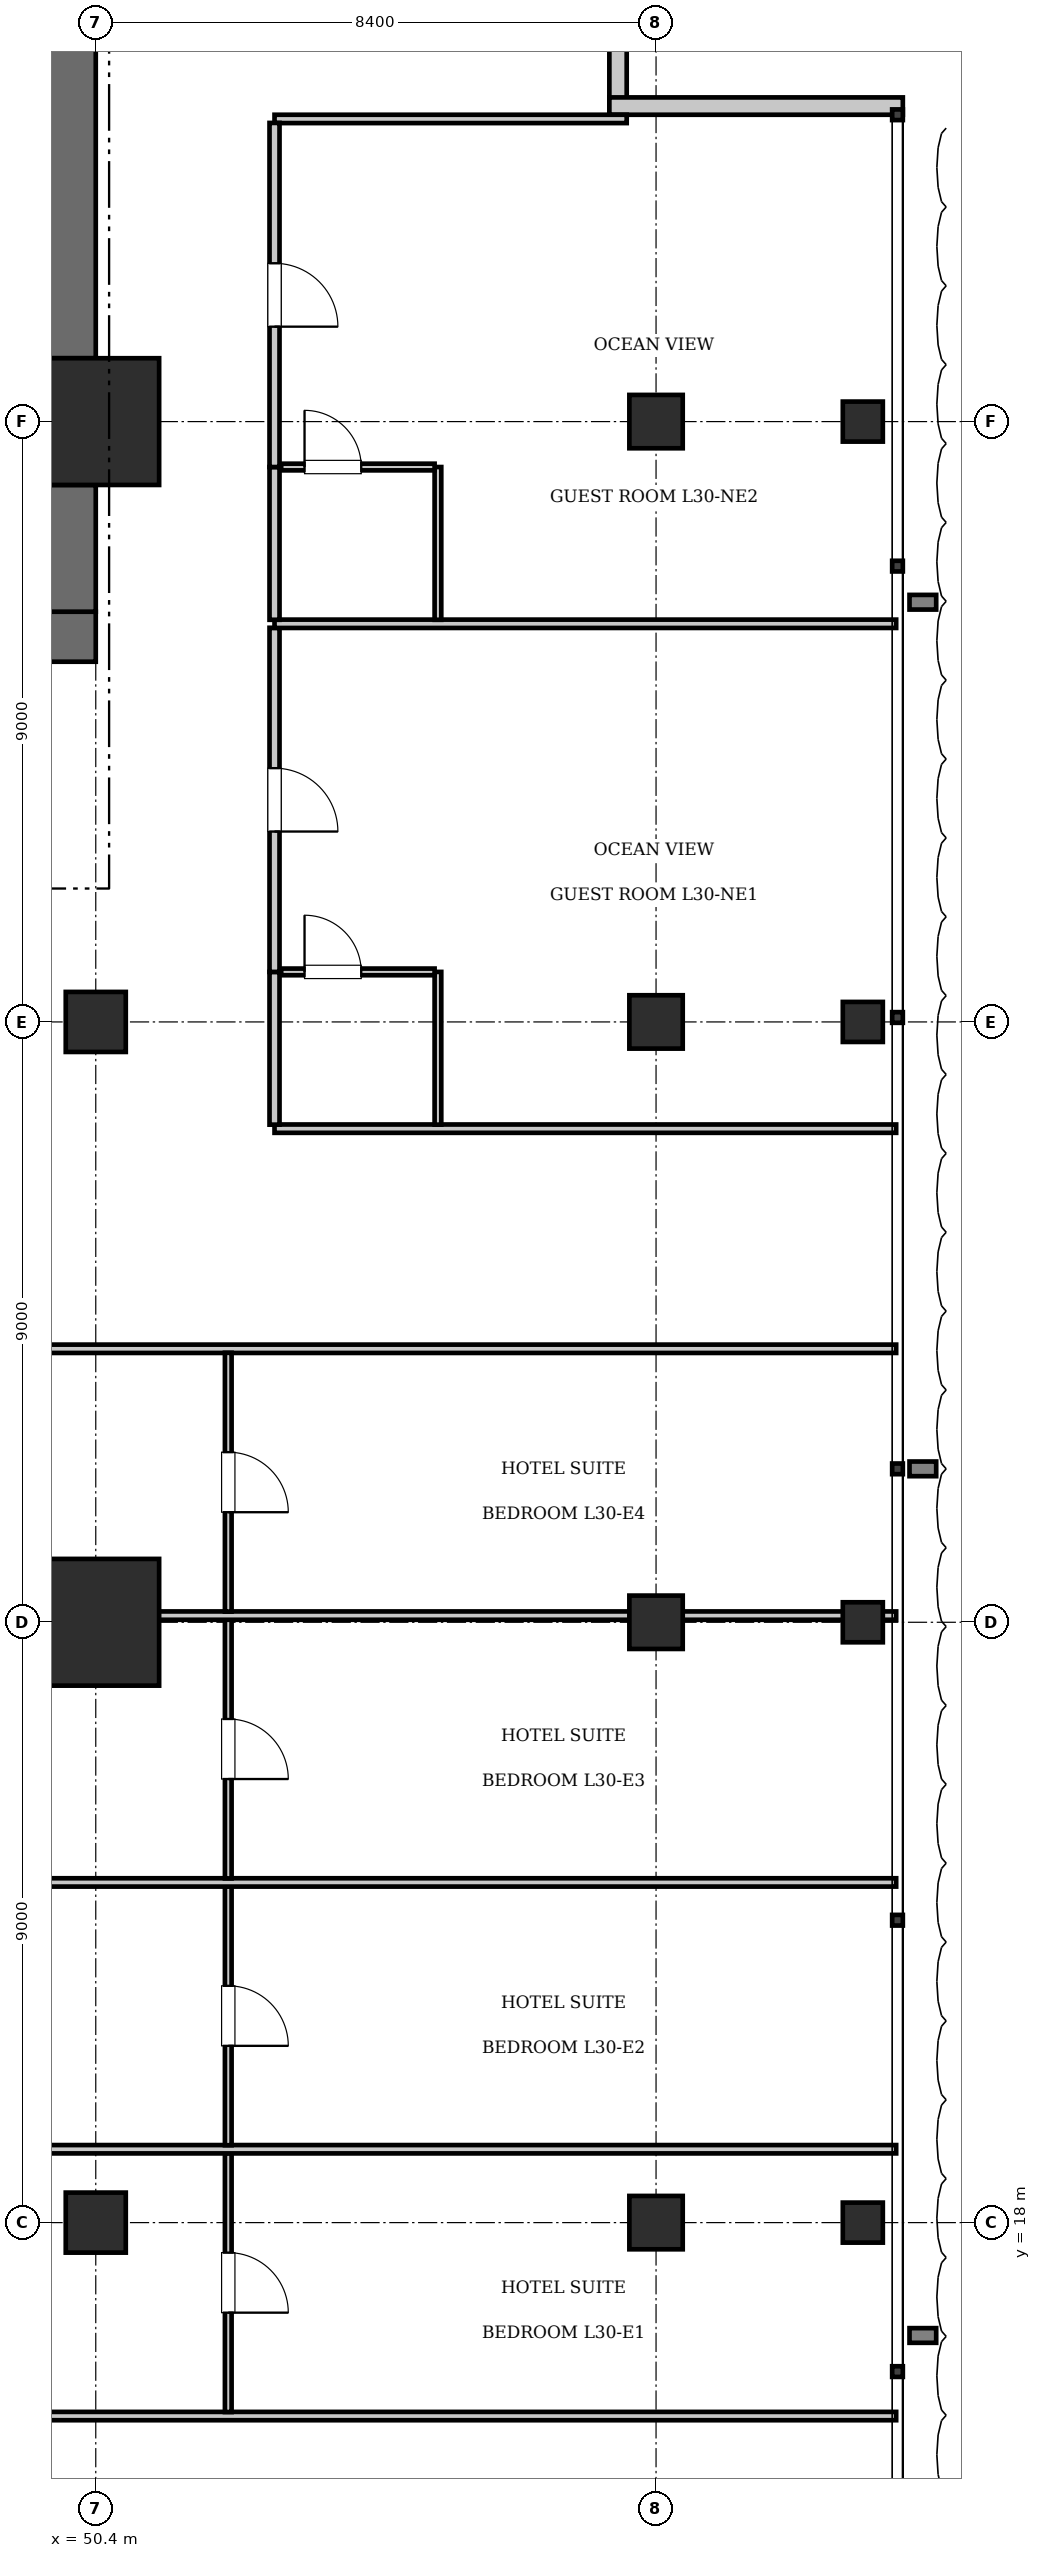
"""IFC4 building model, lengths in metres.
Left out: names, types, materials, properties, quantities, classifications, styles, units other than length and angle.
Written with IfcOpenShell. Run it as: python <this file> out.ifc"""

import sys

from ifc_helpers import new_model, si_unit, direction, frame, frame_2d, origin, origin_2d, place, context, subcontext, project, spatial, rectangle, i_section, extrude, element, fill, save


model = new_model("IFC4")
c1 = context("Model", 3, precision=1e-05, world=origin(), true_north=direction((0.0, 1.0)))
c2 = subcontext(c1, "Body", "Model", "MODEL_VIEW")
j1 = project(units=[si_unit("LENGTHUNIT", "METRE"), si_unit("PLANEANGLEUNIT", "RADIAN")], contexts=[c1])
p1 = place(None, origin())
s1 = spatial("IfcSite", under=j1, at=p1, CompositionType="ELEMENT")
p2 = place(p1, origin())
s2 = spatial("IfcBuilding", under=s1, at=p2, CompositionType="ELEMENT")
p3 = place(p2, frame((0.0, 0.0, 127.4)))
s3 = spatial("IfcBuildingStorey", under=s2, at=p3, CompositionType="ELEMENT", Elevation=127.4)
for number, where, z_axis, x_axis in (
    (1, (50.4, 27.0, 0.0), (0.0, 0.0, 1.0), (1.0, 0.0, 0.0)),
    (2, (50.4, 45.0, 0.0), (0.0, 0.0, 1.0), (1.0, 0.0, 0.0)),
):
    element("IfcColumn", number, at=place(p3, frame(where, z_axis=z_axis, x_axis=x_axis)), inside=s3, PredefinedType="COLUMN", context=c2, shape_type="SweptSolid", body=[
        extrude(rectangle(XDim=1.9, YDim=1.9, at=origin_2d()), origin(), (0.0, 0.0, 1.0), 3.85),
    ])
p4 = place(p3, frame((43.6, 41.775, 0.0), z_axis=(0.0, 0.0, 1.0), x_axis=(1.0, 0.0, 0.0)))
e3 = element("IfcWall", 3, at=p4, inside=s3, PredefinedType="SHEAR", context=c2, shape_type="SweptSolid", body=[
    extrude(rectangle(XDim=6.8, YDim=0.75, at=frame_2d((3.4, 0.0))), origin(), (0.0, 0.0, 1.0), 3.85),
])
p5 = place(p4, frame((3.9, 0.0, 0.0)))
e4 = element("IfcOpeningElement", 4, at=p5, cuts=e3, PredefinedType="OPENING", context=c2, shape_type="SweptSolid", body=[
    extrude(rectangle(XDim=1.15, YDim=2.15, at=frame_2d((0.575, 1.075))), frame((0.0, 0.385, 0.0), z_axis=(0.0, -1.0, 0.0), x_axis=(1.0, 0.0, 0.0)), (0.0, 0.0, 1.0), 0.77),
])
p6 = place(p4, frame((0.55, 0.0, 0.0)))
e5 = element("IfcOpeningElement", 5, at=p6, cuts=e3, PredefinedType="OPENING", context=c2, shape_type="SweptSolid", body=[
    extrude(rectangle(XDim=1.1, YDim=2.2, at=frame_2d((0.55, 1.1))), frame((0.0, 0.385, 0.0), z_axis=(0.0, -1.0, 0.0), x_axis=(1.0, 0.0, 0.0)), (0.0, 0.0, 1.0), 0.77),
])
p7 = place(p3, frame((50.025, 42.15, 0.0), z_axis=(0.0, 0.0, 1.0), x_axis=(0.0, 1.0, 0.0)))
e6 = element("IfcWall", 6, at=p7, inside=s3, PredefinedType="SHEAR", context=c2, shape_type="SweptSolid", body=[
    extrude(rectangle(XDim=1.9, YDim=0.75, at=frame_2d((0.95, 0.0))), origin(), (0.0, 0.0, 1.0), 3.85),
])
p8 = place(p3, frame((50.025, 45.95, 0.0), z_axis=(0.0, 0.0, 1.0), x_axis=(0.0, 1.0, 0.0)))
e7 = element("IfcWall", 7, at=p8, inside=s3, PredefinedType="SHEAR", context=c2, shape_type="SweptSolid", body=[
    extrude(rectangle(XDim=7.3, YDim=0.75, at=frame_2d((3.65, 0.0))), origin(), (0.0, 0.0, 1.0), 3.85),
])
for number, where, z_axis, x_axis in (
    (8, (50.4, 36.0, 0.0), (0.0, 0.0, 1.0), (1.0, 0.0, 0.0)),
    (9, (50.4, 18.0, 0.0), (0.0, 0.0, 1.0), (1.0, 0.0, 0.0)),
):
    element("IfcColumn", number, at=place(p3, frame(where, z_axis=z_axis, x_axis=x_axis)), inside=s3, PredefinedType="COLUMN", context=c2, shape_type="SweptSolid", body=[
        extrude(rectangle(XDim=0.9, YDim=0.9, at=origin_2d()), origin(), (0.0, 0.0, 1.0), 3.85),
    ])
for number, where, z_axis, x_axis in (
    (10, (58.8, 18.0, 0.0), (0.0, 0.0, 1.0), (1.0, 0.0, 0.0)),
    (11, (58.8, 27.0, 0.0), (0.0, 0.0, 1.0), (1.0, 0.0, 0.0)),
    (12, (58.8, 36.0, 0.0), (0.0, 0.0, 1.0), (1.0, 0.0, 0.0)),
    (13, (58.8, 45.0, 0.0), (0.0, 0.0, 1.0), (1.0, 0.0, 0.0)),
):
    element("IfcColumn", number, at=place(p3, frame(where, z_axis=z_axis, x_axis=x_axis)), inside=s3, PredefinedType="COLUMN", context=c2, shape_type="SweptSolid", body=[
        extrude(rectangle(XDim=0.8, YDim=0.8, at=origin_2d()), origin(), (0.0, 0.0, 1.0), 3.85),
    ])
for number, where, z_axis, x_axis in (
    (14, (61.9, 18.0, 0.0), (0.0, 0.0, 1.0), (1.0, 0.0, 0.0)),
    (15, (61.9, 27.0, 0.0), (0.0, 0.0, 1.0), (1.0, 0.0, 0.0)),
    (16, (61.9, 36.0, 0.0), (0.0, 0.0, 1.0), (1.0, 0.0, 0.0)),
    (17, (61.9, 45.0, 0.0), (0.0, 0.0, 1.0), (1.0, 0.0, 0.0)),
):
    element("IfcColumn", number, at=place(p3, frame(where, z_axis=z_axis, x_axis=x_axis)), inside=s3, PredefinedType="COLUMN", context=c2, shape_type="SweptSolid", body=[
        extrude(i_section(OverallWidth=0.6, OverallDepth=0.6, WebThickness=0.025, FlangeThickness=0.038, at=origin_2d()), origin(), (0.0, 0.0, 1.0), 3.85),
    ])
for number, where, z_axis, x_axis in (
    (18, (58.23, 54.0, 0.0), (0.0, 0.0, 1.0), (0.0, -1.0, 0.0)),
    (19, (58.1, 49.73, 0.0), (0.0, 0.0, 1.0), (1.0, 0.0, 0.0)),
):
    element("IfcWall", number, at=place(p3, frame(where, z_axis=z_axis, x_axis=x_axis)), inside=s3, PredefinedType="SOLIDWALL", context=c2, shape_type="SweptSolid", body=[
        extrude(rectangle(XDim=4.4, YDim=0.26, at=frame_2d((2.2, 0.0))), origin(), (0.0, 0.0, 1.0), 3.61),
    ])
for number, where, z_axis, x_axis in (
    (20, (38.98, 15.1, 0.0), (0.0, 0.0, 1.0), (1.0, 0.0, 0.0)),
    (21, (38.98, 31.1, 0.0), (0.0, 0.0, 1.0), (1.0, 0.0, 0.0)),
):
    element("IfcWall", number, at=place(p3, frame(where, z_axis=z_axis, x_axis=x_axis)), inside=s3, PredefinedType="PARTITIONING", context=c2, shape_type="SweptSolid", body=[
        extrude(rectangle(XDim=23.42, YDim=0.125, at=frame_2d((11.71, 0.0))), origin(), (0.0, 0.0, 1.0), 3.61),
    ])
p9 = place(p3, frame((52.386, 15.16, 0.0), z_axis=(0.0, 0.0, 1.0), x_axis=(0.0, 1.0, 0.0)))
e22 = element("IfcWall", 22, at=p9, inside=s3, PredefinedType="PARTITIONING", context=c2, shape_type="SweptSolid", body=[
    extrude(rectangle(XDim=3.88, YDim=0.1, at=frame_2d((1.94, 0.0))), origin(), (0.0, 0.0, 1.0), 3.61),
])
p10 = place(p9, frame((1.49, 0.0, 0.0)))
e23 = element("IfcOpeningElement", 23, at=p10, cuts=e22, PredefinedType="OPENING", context=c2, shape_type="SweptSolid", body=[
    extrude(rectangle(XDim=0.9, YDim=2.1, at=frame_2d((0.45, 1.05))), frame((0.0, 0.06, 0.0), z_axis=(0.0, -1.0, 0.0), x_axis=(1.0, 0.0, 0.0)), (0.0, 0.0, 1.0), 0.12),
])
p11 = place(p3, frame((38.98, 19.1, 0.0), z_axis=(0.0, 0.0, 1.0), x_axis=(1.0, 0.0, 0.0)))
e24 = element("IfcWall", 24, at=p11, inside=s3, PredefinedType="PARTITIONING", context=c2, shape_type="SweptSolid", body=[
    extrude(rectangle(XDim=23.42, YDim=0.125, at=frame_2d((11.71, 0.0))), origin(), (0.0, 0.0, 1.0), 3.61),
])
p12 = place(p3, frame((52.386, 19.16, 0.0), z_axis=(0.0, 0.0, 1.0), x_axis=(0.0, 1.0, 0.0)))
e25 = element("IfcWall", 25, at=p12, inside=s3, PredefinedType="PARTITIONING", context=c2, shape_type="SweptSolid", body=[
    extrude(rectangle(XDim=3.88, YDim=0.1, at=frame_2d((1.94, 0.0))), origin(), (0.0, 0.0, 1.0), 3.61),
])
p13 = place(p12, frame((1.49, 0.0, 0.0)))
e26 = element("IfcOpeningElement", 26, at=p13, cuts=e25, PredefinedType="OPENING", context=c2, shape_type="SweptSolid", body=[
    extrude(rectangle(XDim=0.9, YDim=2.1, at=frame_2d((0.45, 1.05))), frame((0.0, 0.06, 0.0), z_axis=(0.0, -1.0, 0.0), x_axis=(1.0, 0.0, 0.0)), (0.0, 0.0, 1.0), 0.12),
])
p14 = place(p3, frame((38.98, 23.1, 0.0), z_axis=(0.0, 0.0, 1.0), x_axis=(1.0, 0.0, 0.0)))
e27 = element("IfcWall", 27, at=p14, inside=s3, PredefinedType="PARTITIONING", context=c2, shape_type="SweptSolid", body=[
    extrude(rectangle(XDim=23.42, YDim=0.125, at=frame_2d((11.71, 0.0))), origin(), (0.0, 0.0, 1.0), 3.61),
])
p15 = place(p3, frame((52.386, 23.16, 0.0), z_axis=(0.0, 0.0, 1.0), x_axis=(0.0, 1.0, 0.0)))
e28 = element("IfcWall", 28, at=p15, inside=s3, PredefinedType="PARTITIONING", context=c2, shape_type="SweptSolid", body=[
    extrude(rectangle(XDim=3.88, YDim=0.1, at=frame_2d((1.94, 0.0))), origin(), (0.0, 0.0, 1.0), 3.61),
])
p16 = place(p15, frame((1.49, 0.0, 0.0)))
e29 = element("IfcOpeningElement", 29, at=p16, cuts=e28, PredefinedType="OPENING", context=c2, shape_type="SweptSolid", body=[
    extrude(rectangle(XDim=0.9, YDim=2.1, at=frame_2d((0.45, 1.05))), frame((0.0, 0.06, 0.0), z_axis=(0.0, -1.0, 0.0), x_axis=(1.0, 0.0, 0.0)), (0.0, 0.0, 1.0), 0.12),
])
p17 = place(p3, frame((38.98, 27.1, 0.0), z_axis=(0.0, 0.0, 1.0), x_axis=(1.0, 0.0, 0.0)))
e30 = element("IfcWall", 30, at=p17, inside=s3, PredefinedType="PARTITIONING", context=c2, shape_type="SweptSolid", body=[
    extrude(rectangle(XDim=23.42, YDim=0.125, at=frame_2d((11.71, 0.0))), origin(), (0.0, 0.0, 1.0), 2.41),
])
p18 = place(p3, frame((52.386, 27.16, 0.0), z_axis=(0.0, 0.0, 1.0), x_axis=(0.0, 1.0, 0.0)))
e31 = element("IfcWall", 31, at=p18, inside=s3, PredefinedType="PARTITIONING", context=c2, shape_type="SweptSolid", body=[
    extrude(rectangle(XDim=3.88, YDim=0.1, at=frame_2d((1.94, 0.0))), origin(), (0.0, 0.0, 1.0), 3.61),
])
p19 = place(p18, frame((1.49, 0.0, 0.0)))
e32 = element("IfcOpeningElement", 32, at=p19, cuts=e31, PredefinedType="OPENING", context=c2, shape_type="SweptSolid", body=[
    extrude(rectangle(XDim=0.9, YDim=2.1, at=frame_2d((0.45, 1.05))), frame((0.0, 0.06, 0.0), z_axis=(0.0, -1.0, 0.0), x_axis=(1.0, 0.0, 0.0)), (0.0, 0.0, 1.0), 0.12),
])
p20 = place(p3, frame((53.08, 34.4, 0.0), z_axis=(0.0, 0.0, 1.0), x_axis=(1.0, 0.0, 0.0)))
e33 = element("IfcWall", 33, at=p20, inside=s3, PredefinedType="PARTITIONING", context=c2, shape_type="SweptSolid", body=[
    extrude(rectangle(XDim=9.32, YDim=0.125, at=frame_2d((4.66, 0.0))), origin(), (0.0, 0.0, 1.0), 3.61),
])
p21 = place(p3, frame((53.08, 49.538, 0.0), z_axis=(0.0, 0.0, 1.0), x_axis=(1.0, 0.0, 0.0)))
e34 = element("IfcWall", 34, at=p21, inside=s3, PredefinedType="PARTITIONING", context=c2, shape_type="SweptSolid", body=[
    extrude(rectangle(XDim=5.28, YDim=0.125, at=frame_2d((2.64, 0.0))), origin(), (0.0, 0.0, 1.0), 3.61),
])
p22 = place(p3, frame((53.08, 34.46, 0.0), z_axis=(0.0, 0.0, 1.0), x_axis=(0.0, 1.0, 0.0)))
e35 = element("IfcWall", 35, at=p22, inside=s3, PredefinedType="PARTITIONING", context=c2, shape_type="SweptSolid", body=[
    extrude(rectangle(XDim=2.29, YDim=0.15, at=frame_2d((1.145, 0.0))), origin(), (0.0, 0.0, 1.0), 3.61),
])
p23 = place(p3, frame((53.08, 36.75, 0.0), z_axis=(0.0, 0.0, 1.0), x_axis=(0.0, 1.0, 0.0)))
e36 = element("IfcWall", 36, at=p23, inside=s3, PredefinedType="PARTITIONING", context=c2, shape_type="SweptSolid", body=[
    extrude(rectangle(XDim=5.159, YDim=0.15, at=frame_2d((2.579, 0.0))), origin(), (0.0, 0.0, 1.0), 3.61),
])
p24 = place(p23, frame((2.104, 0.0, 0.0)))
e37 = element("IfcOpeningElement", 37, at=p24, cuts=e36, PredefinedType="OPENING", context=c2, shape_type="SweptSolid", body=[
    extrude(rectangle(XDim=0.95, YDim=2.15, at=frame_2d((0.475, 1.075))), frame((0.0, 0.085, 0.0), z_axis=(0.0, -1.0, 0.0), x_axis=(1.0, 0.0, 0.0)), (0.0, 0.0, 1.0), 0.17),
])
p25 = place(p3, frame((55.53, 34.46, 0.0), z_axis=(0.0, 0.0, 1.0), x_axis=(0.0, 1.0, 0.0)))
e38 = element("IfcWall", 38, at=p25, inside=s3, PredefinedType="PARTITIONING", context=c2, shape_type="SweptSolid", body=[
    extrude(rectangle(XDim=2.29, YDim=0.1, at=frame_2d((1.145, 0.0))), origin(), (0.0, 0.0, 1.0), 3.61),
])
p26 = place(p3, frame((53.18, 36.75, 0.0), z_axis=(0.0, 0.0, 1.0), x_axis=(1.0, 0.0, 0.0)))
e39 = element("IfcWall", 39, at=p26, inside=s3, PredefinedType="PARTITIONING", context=c2, shape_type="SweptSolid", body=[
    extrude(rectangle(XDim=2.3, YDim=0.1, at=frame_2d((1.15, 0.0))), origin(), (0.0, 0.0, 1.0), 3.61),
])
p27 = place(p26, frame((0.35, 0.0, 0.0)))
e40 = element("IfcOpeningElement", 40, at=p27, cuts=e39, PredefinedType="OPENING", context=c2, shape_type="SweptSolid", body=[
    extrude(rectangle(XDim=0.85, YDim=2.1, at=frame_2d((0.425, 1.05))), frame((0.0, 0.06, 0.0), z_axis=(0.0, -1.0, 0.0), x_axis=(1.0, 0.0, 0.0)), (0.0, 0.0, 1.0), 0.12),
])
p28 = place(p3, frame((53.08, 41.969, 0.0), z_axis=(0.0, 0.0, 1.0), x_axis=(1.0, 0.0, 0.0)))
e41 = element("IfcWall", 41, at=p28, inside=s3, PredefinedType="PARTITIONING", context=c2, shape_type="SweptSolid", body=[
    extrude(rectangle(XDim=9.32, YDim=0.125, at=frame_2d((4.66, 0.0))), origin(), (0.0, 0.0, 1.0), 3.61),
])
p29 = place(p3, frame((53.08, 42.029, 0.0), z_axis=(0.0, 0.0, 1.0), x_axis=(0.0, 1.0, 0.0)))
e42 = element("IfcWall", 42, at=p29, inside=s3, PredefinedType="PARTITIONING", context=c2, shape_type="SweptSolid", body=[
    extrude(rectangle(XDim=2.29, YDim=0.15, at=frame_2d((1.145, 0.0))), origin(), (0.0, 0.0, 1.0), 3.61),
])
p30 = place(p3, frame((53.08, 44.319, 0.0), z_axis=(0.0, 0.0, 1.0), x_axis=(0.0, 1.0, 0.0)))
e43 = element("IfcWall", 43, at=p30, inside=s3, PredefinedType="PARTITIONING", context=c2, shape_type="SweptSolid", body=[
    extrude(rectangle(XDim=5.159, YDim=0.15, at=frame_2d((2.579, 0.0))), origin(), (0.0, 0.0, 1.0), 3.61),
])
p31 = place(p30, frame((2.104, 0.0, 0.0)))
e44 = element("IfcOpeningElement", 44, at=p31, cuts=e43, PredefinedType="OPENING", context=c2, shape_type="SweptSolid", body=[
    extrude(rectangle(XDim=0.95, YDim=2.15, at=frame_2d((0.475, 1.075))), frame((0.0, 0.085, 0.0), z_axis=(0.0, -1.0, 0.0), x_axis=(1.0, 0.0, 0.0)), (0.0, 0.0, 1.0), 0.17),
])
p32 = place(p3, frame((55.53, 42.029, 0.0), z_axis=(0.0, 0.0, 1.0), x_axis=(0.0, 1.0, 0.0)))
e45 = element("IfcWall", 45, at=p32, inside=s3, PredefinedType="PARTITIONING", context=c2, shape_type="SweptSolid", body=[
    extrude(rectangle(XDim=2.29, YDim=0.1, at=frame_2d((1.145, 0.0))), origin(), (0.0, 0.0, 1.0), 3.61),
])
p33 = place(p3, frame((53.18, 44.319, 0.0), z_axis=(0.0, 0.0, 1.0), x_axis=(1.0, 0.0, 0.0)))
e46 = element("IfcWall", 46, at=p33, inside=s3, PredefinedType="PARTITIONING", context=c2, shape_type="SweptSolid", body=[
    extrude(rectangle(XDim=2.3, YDim=0.1, at=frame_2d((1.15, 0.0))), origin(), (0.0, 0.0, 1.0), 3.61),
])
p34 = place(p33, frame((0.35, 0.0, 0.0)))
e47 = element("IfcOpeningElement", 47, at=p34, cuts=e46, PredefinedType="OPENING", context=c2, shape_type="SweptSolid", body=[
    extrude(rectangle(XDim=0.85, YDim=2.1, at=frame_2d((0.425, 1.05))), frame((0.0, 0.06, 0.0), z_axis=(0.0, -1.0, 0.0), x_axis=(1.0, 0.0, 0.0)), (0.0, 0.0, 1.0), 0.12),
])
p35 = place(p10, frame((0.9, 0.0, 0.0), z_axis=(0.0, 0.0, 1.0), x_axis=(-1.0, 0.0, 0.0)))
e48 = element("IfcDoor", 48, at=p35, inside=s3, OperationType="SINGLE_SWING_RIGHT", PredefinedType="DOOR", context=c2, shape_type="SweptSolid", body=[
    extrude(rectangle(XDim=0.9, YDim=2.1, at=frame_2d((0.45, 1.05))), frame((0.0, 0.025, 0.0), z_axis=(0.0, -1.0, 0.0), x_axis=(1.0, 0.0, 0.0)), (0.0, 0.0, 1.0), 0.05),
])
fill(e23, e48)
p36 = place(p13, frame((0.9, 0.0, 0.0), z_axis=(0.0, 0.0, 1.0), x_axis=(-1.0, 0.0, 0.0)))
e49 = element("IfcDoor", 49, at=p36, inside=s3, OperationType="SINGLE_SWING_RIGHT", PredefinedType="DOOR", context=c2, shape_type="SweptSolid", body=[
    extrude(rectangle(XDim=0.9, YDim=2.1, at=frame_2d((0.45, 1.05))), frame((0.0, 0.025, 0.0), z_axis=(0.0, -1.0, 0.0), x_axis=(1.0, 0.0, 0.0)), (0.0, 0.0, 1.0), 0.05),
])
fill(e26, e49)
p37 = place(p16, frame((0.9, 0.0, 0.0), z_axis=(0.0, 0.0, 1.0), x_axis=(-1.0, 0.0, 0.0)))
e50 = element("IfcDoor", 50, at=p37, inside=s3, OperationType="SINGLE_SWING_RIGHT", PredefinedType="DOOR", context=c2, shape_type="SweptSolid", body=[
    extrude(rectangle(XDim=0.9, YDim=2.1, at=frame_2d((0.45, 1.05))), frame((0.0, 0.025, 0.0), z_axis=(0.0, -1.0, 0.0), x_axis=(1.0, 0.0, 0.0)), (0.0, 0.0, 1.0), 0.05),
])
fill(e29, e50)
p38 = place(p19, frame((0.9, 0.0, 0.0), z_axis=(0.0, 0.0, 1.0), x_axis=(-1.0, 0.0, 0.0)))
e51 = element("IfcDoor", 51, at=p38, inside=s3, OperationType="SINGLE_SWING_RIGHT", PredefinedType="DOOR", context=c2, shape_type="SweptSolid", body=[
    extrude(rectangle(XDim=0.9, YDim=2.1, at=frame_2d((0.45, 1.05))), frame((0.0, 0.025, 0.0), z_axis=(0.0, -1.0, 0.0), x_axis=(1.0, 0.0, 0.0)), (0.0, 0.0, 1.0), 0.05),
])
fill(e32, e51)
p39 = place(p27, origin())
e52 = element("IfcDoor", 52, at=p39, inside=s3, OperationType="SINGLE_SWING_LEFT", PredefinedType="DOOR", context=c2, shape_type="SweptSolid", body=[
    extrude(rectangle(XDim=0.85, YDim=2.1, at=frame_2d((0.425, 1.05))), frame((0.0, 0.025, 0.0), z_axis=(0.0, -1.0, 0.0), x_axis=(1.0, 0.0, 0.0)), (0.0, 0.0, 1.0), 0.05),
])
fill(e40, e52)
p40 = place(p24, frame((0.95, 0.0, 0.0), z_axis=(0.0, 0.0, 1.0), x_axis=(-1.0, 0.0, 0.0)))
e53 = element("IfcDoor", 53, at=p40, inside=s3, OperationType="SINGLE_SWING_RIGHT", PredefinedType="DOOR", context=c2, shape_type="SweptSolid", body=[
    extrude(rectangle(XDim=0.95, YDim=2.15, at=frame_2d((0.475, 1.075))), frame((0.0, 0.025, 0.0), z_axis=(0.0, -1.0, 0.0), x_axis=(1.0, 0.0, 0.0)), (0.0, 0.0, 1.0), 0.05),
])
fill(e37, e53)
p41 = place(p34, origin())
e54 = element("IfcDoor", 54, at=p41, inside=s3, OperationType="SINGLE_SWING_LEFT", PredefinedType="DOOR", context=c2, shape_type="SweptSolid", body=[
    extrude(rectangle(XDim=0.85, YDim=2.1, at=frame_2d((0.425, 1.05))), frame((0.0, 0.025, 0.0), z_axis=(0.0, -1.0, 0.0), x_axis=(1.0, 0.0, 0.0)), (0.0, 0.0, 1.0), 0.05),
])
fill(e47, e54)
p42 = place(p31, frame((0.95, 0.0, 0.0), z_axis=(0.0, 0.0, 1.0), x_axis=(-1.0, 0.0, 0.0)))
e55 = element("IfcDoor", 55, at=p42, inside=s3, OperationType="SINGLE_SWING_RIGHT", PredefinedType="DOOR", context=c2, shape_type="SweptSolid", body=[
    extrude(rectangle(XDim=0.95, YDim=2.15, at=frame_2d((0.475, 1.075))), frame((0.0, 0.025, 0.0), z_axis=(0.0, -1.0, 0.0), x_axis=(1.0, 0.0, 0.0)), (0.0, 0.0, 1.0), 0.05),
])
fill(e44, e55)
save(model, sys.argv[1])
